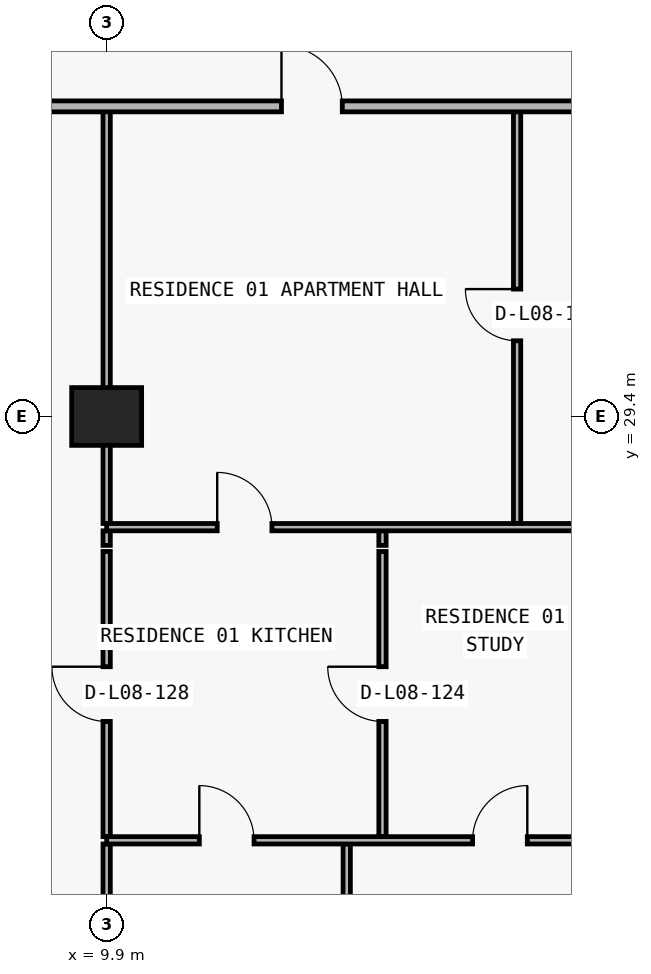
"""IFC4 building model, lengths in metres.
Left out: names, types, materials, properties, quantities, classifications, styles, units other than length and angle.
Written with IfcOpenShell. Run it as: python <this file> out.ifc"""

import sys

from ifc_helpers import new_model, si_unit, direction, frame, frame_2d, origin, origin_2d, place, context, subcontext, project, spatial, rectangle, extrude, element, fill, save


model = new_model("IFC4")
c1 = context("Model", 3, precision=1e-05, world=origin(), true_north=direction((0.0, 1.0)))
c2 = subcontext(c1, "Body", "Model", "MODEL_VIEW")
j1 = project(units=[si_unit("LENGTHUNIT", "METRE"), si_unit("PLANEANGLEUNIT", "RADIAN")], contexts=[c1])
p1 = place(None, origin())
s1 = spatial("IfcSite", under=j1, at=p1, CompositionType="ELEMENT")
p2 = place(p1, origin())
s2 = spatial("IfcBuilding", under=s1, at=p2, CompositionType="ELEMENT")
p3 = place(p2, frame((0.0, 0.0, 36.6)))
s3 = spatial("IfcBuildingStorey", under=s2, at=p3, CompositionType="ELEMENT", Elevation=36.6)
p4 = place(p3, frame((9.9, 29.4, 0.0), z_axis=(0.0, 0.0, 1.0), x_axis=(1.0, 0.0, 0.0)))
e1 = element("IfcColumn", 1, at=p4, inside=s3, PredefinedType="COLUMN", context=c2, shape_type="SweptSolid", body=[
    extrude(rectangle(XDim=1.15, YDim=0.95, at=origin_2d()), origin(), (0.0, 0.0, 1.0), 3.05),
])
p5 = place(p3, frame((9.9, 6.24, 0.0), z_axis=(0.0, 0.0, 1.0), x_axis=(0.0, 1.0, 0.0)))
e2 = element("IfcWall", 2, at=p5, inside=s3, PredefinedType="PARTITIONING", context=c2, shape_type="SweptSolid", body=[
    extrude(rectangle(XDim=16.13, YDim=0.12, at=frame_2d((8.065, 0.0))), origin(), (0.0, 0.0, 1.0), 2.11),
])
p6 = place(p3, frame((9.9, 22.49, 0.0), z_axis=(0.0, 0.0, 1.0), x_axis=(0.0, 1.0, 0.0)))
e3 = element("IfcWall", 3, at=p6, inside=s3, PredefinedType="PARTITIONING", context=c2, shape_type="SweptSolid", body=[
    extrude(rectangle(XDim=4.69, YDim=0.12, at=frame_2d((2.345, 0.0))), origin(), (0.0, 0.0, 1.0), 2.11),
])
p7 = place(p6, frame((1.895, 0.0, 0.0)))
e4 = element("IfcOpeningElement", 4, at=p7, cuts=e3, PredefinedType="OPENING", context=c2, shape_type="SweptSolid", body=[
    extrude(rectangle(XDim=0.9, YDim=2.06, at=frame_2d((0.45, 1.03))), frame((0.0, 0.07, 0.0), z_axis=(0.0, -1.0, 0.0), x_axis=(1.0, 0.0, 0.0)), (0.0, 0.0, 1.0), 0.14),
])
p8 = place(p3, frame((9.9, 27.28, 0.0), z_axis=(0.0, 0.0, 1.0), x_axis=(0.0, 1.0, 0.0)))
e5 = element("IfcWall", 5, at=p8, inside=s3, PredefinedType="PARTITIONING", context=c2, shape_type="SweptSolid", body=[
    extrude(rectangle(XDim=0.24, YDim=0.12, at=frame_2d((0.12, 0.0))), origin(), (0.0, 0.0, 1.0), 2.11),
])
p9 = place(p3, frame((9.9, 27.64, 0.0), z_axis=(0.0, 0.0, 1.0), x_axis=(0.0, 1.0, 0.0)))
e6 = element("IfcWall", 6, at=p9, inside=s3, PredefinedType="PARTITIONING", context=c2, shape_type="SweptSolid", body=[
    extrude(rectangle(XDim=6.86, YDim=0.12, at=frame_2d((3.43, 0.0))), origin(), (0.0, 0.0, 1.0), 2.11),
])
p10 = place(p3, frame((13.848, 6.24, 0.0), z_axis=(0.0, 0.0, 1.0), x_axis=(0.0, 1.0, 0.0)))
e7 = element("IfcWall", 7, at=p10, inside=s3, PredefinedType="PARTITIONING", context=c2, shape_type="SweptSolid", body=[
    extrude(rectangle(XDim=16.13, YDim=0.12, at=frame_2d((8.065, 0.0))), origin(), (0.0, 0.0, 1.0), 3.05),
])
p11 = place(p3, frame((14.436, 22.49, 0.0), z_axis=(0.0, 0.0, 1.0), x_axis=(0.0, 1.0, 0.0)))
e8 = element("IfcWall", 8, at=p11, inside=s3, PredefinedType="PARTITIONING", context=c2, shape_type="SweptSolid", body=[
    extrude(rectangle(XDim=4.69, YDim=0.12, at=frame_2d((2.345, 0.0))), origin(), (0.0, 0.0, 1.0), 3.05),
])
p12 = place(p11, frame((1.895, 0.0, 0.0)))
e9 = element("IfcOpeningElement", 9, at=p12, cuts=e8, PredefinedType="OPENING", context=c2, shape_type="SweptSolid", body=[
    extrude(rectangle(XDim=0.9, YDim=2.15, at=frame_2d((0.45, 1.075))), frame((0.0, 0.07, 0.0), z_axis=(0.0, -1.0, 0.0), x_axis=(1.0, 0.0, 0.0)), (0.0, 0.0, 1.0), 0.14),
])
p13 = place(p3, frame((14.436, 27.28, 0.0), z_axis=(0.0, 0.0, 1.0), x_axis=(0.0, 1.0, 0.0)))
e10 = element("IfcWall", 10, at=p13, inside=s3, PredefinedType="PARTITIONING", context=c2, shape_type="SweptSolid", body=[
    extrude(rectangle(XDim=0.24, YDim=0.12, at=frame_2d((0.12, 0.0))), origin(), (0.0, 0.0, 1.0), 3.05),
])
p14 = place(p3, frame((16.65, 27.64, 0.0), z_axis=(0.0, 0.0, 1.0), x_axis=(0.0, 1.0, 0.0)))
e11 = element("IfcWall", 11, at=p14, inside=s3, PredefinedType="PARTITIONING", context=c2, shape_type="SweptSolid", body=[
    extrude(rectangle(XDim=6.86, YDim=0.12, at=frame_2d((3.43, 0.0))), origin(), (0.0, 0.0, 1.0), 3.05),
])
p15 = place(p14, frame((3.005, 0.0, 0.0)))
e12 = element("IfcOpeningElement", 12, at=p15, cuts=e11, PredefinedType="OPENING", context=c2, shape_type="SweptSolid", body=[
    extrude(rectangle(XDim=0.85, YDim=2.1, at=frame_2d((0.425, 1.05))), frame((0.0, 0.07, 0.0), z_axis=(0.0, -1.0, 0.0), x_axis=(1.0, 0.0, 0.0)), (0.0, 0.0, 1.0), 0.14),
])
p16 = place(p3, frame((9.9, 22.43, 0.0), z_axis=(0.0, 0.0, 1.0), x_axis=(1.0, 0.0, 0.0)))
e13 = element("IfcWall", 13, at=p16, inside=s3, PredefinedType="PARTITIONING", context=c2, shape_type="SweptSolid", body=[
    extrude(rectangle(XDim=8.4, YDim=0.12, at=frame_2d((4.2, 0.0))), origin(), (0.0, 0.0, 1.0), 3.05),
])
p17 = place(p16, frame((1.524, 0.0, 0.0)))
e14 = element("IfcOpeningElement", 14, at=p17, cuts=e13, PredefinedType="OPENING", context=c2, shape_type="SweptSolid", body=[
    extrude(rectangle(XDim=0.9, YDim=2.15, at=frame_2d((0.45, 1.075))), frame((0.0, 0.07, 0.0), z_axis=(0.0, -1.0, 0.0), x_axis=(1.0, 0.0, 0.0)), (0.0, 0.0, 1.0), 0.14),
])
p18 = place(p16, frame((6.018, 0.0, 0.0)))
e15 = element("IfcOpeningElement", 15, at=p18, cuts=e13, PredefinedType="OPENING", context=c2, shape_type="SweptSolid", body=[
    extrude(rectangle(XDim=0.9, YDim=2.15, at=frame_2d((0.45, 1.075))), frame((0.0, 0.07, 0.0), z_axis=(0.0, -1.0, 0.0), x_axis=(1.0, 0.0, 0.0)), (0.0, 0.0, 1.0), 0.14),
])
p19 = place(p3, frame((9.9, 27.58, 0.0), z_axis=(0.0, 0.0, 1.0), x_axis=(1.0, 0.0, 0.0)))
e16 = element("IfcWall", 16, at=p19, inside=s3, PredefinedType="PARTITIONING", context=c2, shape_type="SweptSolid", body=[
    extrude(rectangle(XDim=8.4, YDim=0.12, at=frame_2d((4.2, 0.0))), origin(), (0.0, 0.0, 1.0), 3.05),
])
p20 = place(p19, frame((1.818, 0.0, 0.0)))
e17 = element("IfcOpeningElement", 17, at=p20, cuts=e16, PredefinedType="OPENING", context=c2, shape_type="SweptSolid", body=[
    extrude(rectangle(XDim=0.9, YDim=2.15, at=frame_2d((0.45, 1.075))), frame((0.0, 0.07, 0.0), z_axis=(0.0, -1.0, 0.0), x_axis=(1.0, 0.0, 0.0)), (0.0, 0.0, 1.0), 0.14),
])
p21 = place(p3, frame((5.105, 34.5, 0.0), z_axis=(0.0, 0.0, 1.0), x_axis=(1.0, 0.0, 0.0)))
e18 = element("IfcWall", 18, at=p21, inside=s3, PredefinedType="PARTITIONING", context=c2, shape_type="SweptSolid", body=[
    extrude(rectangle(XDim=50.781, YDim=0.18, at=frame_2d((25.391, 0.0))), origin(), (0.0, 0.0, 1.0), 3.05),
])
p22 = place(p21, frame((7.67, 0.0, 0.0)))
e19 = element("IfcOpeningElement", 19, at=p22, cuts=e18, PredefinedType="OPENING", context=c2, shape_type="SweptSolid", body=[
    extrude(rectangle(XDim=1.0, YDim=2.2, at=frame_2d((0.5, 1.1))), frame((0.0, 0.1, 0.0), z_axis=(0.0, -1.0, 0.0), x_axis=(1.0, 0.0, 0.0)), (0.0, 0.0, 1.0), 0.2),
])
p23 = place(p21, frame((16.07, 0.0, 0.0)))
e20 = element("IfcOpeningElement", 20, at=p23, cuts=e18, PredefinedType="OPENING", context=c2, shape_type="SweptSolid", body=[
    extrude(rectangle(XDim=1.0, YDim=2.2, at=frame_2d((0.5, 1.1))), frame((0.0, 0.1, 0.0), z_axis=(0.0, -1.0, 0.0), x_axis=(1.0, 0.0, 0.0)), (0.0, 0.0, 1.0), 0.2),
])
p24 = place(p21, frame((24.47, 0.0, 0.0)))
e21 = element("IfcOpeningElement", 21, at=p24, cuts=e18, PredefinedType="OPENING", context=c2, shape_type="SweptSolid", body=[
    extrude(rectangle(XDim=1.0, YDim=2.2, at=frame_2d((0.5, 1.1))), frame((0.0, 0.1, 0.0), z_axis=(0.0, -1.0, 0.0), x_axis=(1.0, 0.0, 0.0)), (0.0, 0.0, 1.0), 0.2),
])
p25 = place(p21, frame((32.545, 0.0, 0.0)))
e22 = element("IfcOpeningElement", 22, at=p25, cuts=e18, PredefinedType="OPENING", context=c2, shape_type="SweptSolid", body=[
    extrude(rectangle(XDim=1.0, YDim=2.2, at=frame_2d((0.5, 1.1))), frame((0.0, 0.1, 0.0), z_axis=(0.0, -1.0, 0.0), x_axis=(1.0, 0.0, 0.0)), (0.0, 0.0, 1.0), 0.2),
])
p26 = place(p21, frame((47.888, 0.0, 0.0)))
e23 = element("IfcOpeningElement", 23, at=p26, cuts=e18, PredefinedType="OPENING", context=c2, shape_type="SweptSolid", body=[
    extrude(rectangle(XDim=1.0, YDim=2.2, at=frame_2d((0.5, 1.1))), frame((0.0, 0.1, 0.0), z_axis=(0.0, -1.0, 0.0), x_axis=(1.0, 0.0, 0.0)), (0.0, 0.0, 1.0), 0.2),
])
p27 = place(p22, origin())
e24 = element("IfcDoor", 24, at=p27, inside=s3, OperationType="SINGLE_SWING_LEFT", PredefinedType="DOOR", context=c2, shape_type="SweptSolid", body=[
    extrude(rectangle(XDim=1.0, YDim=2.2, at=frame_2d((0.5, 1.1))), frame((0.0, 0.025, 0.0), z_axis=(0.0, -1.0, 0.0), x_axis=(1.0, 0.0, 0.0)), (0.0, 0.0, 1.0), 0.05),
])
fill(e19, e24)
p28 = place(p15, origin())
e25 = element("IfcDoor", 25, at=p28, inside=s3, OperationType="SINGLE_SWING_RIGHT", PredefinedType="DOOR", context=c2, shape_type="SweptSolid", body=[
    extrude(rectangle(XDim=0.85, YDim=2.1, at=frame_2d((0.425, 1.05))), frame((0.0, 0.025, 0.0), z_axis=(0.0, -1.0, 0.0), x_axis=(1.0, 0.0, 0.0)), (0.0, 0.0, 1.0), 0.05),
])
fill(e12, e25)
p29 = place(p20, origin())
e26 = element("IfcDoor", 26, at=p29, inside=s3, OperationType="SINGLE_SWING_LEFT", PredefinedType="DOOR", context=c2, shape_type="SweptSolid", body=[
    extrude(rectangle(XDim=0.9, YDim=2.15, at=frame_2d((0.45, 1.075))), frame((0.0, 0.025, 0.0), z_axis=(0.0, -1.0, 0.0), x_axis=(1.0, 0.0, 0.0)), (0.0, 0.0, 1.0), 0.05),
])
fill(e17, e26)
p30 = place(p12, origin())
e27 = element("IfcDoor", 27, at=p30, inside=s3, OperationType="SINGLE_SWING_RIGHT", PredefinedType="DOOR", context=c2, shape_type="SweptSolid", body=[
    extrude(rectangle(XDim=0.9, YDim=2.15, at=frame_2d((0.45, 1.075))), frame((0.0, 0.025, 0.0), z_axis=(0.0, -1.0, 0.0), x_axis=(1.0, 0.0, 0.0)), (0.0, 0.0, 1.0), 0.05),
])
fill(e9, e27)
p31 = place(p17, origin())
e28 = element("IfcDoor", 28, at=p31, inside=s3, OperationType="SINGLE_SWING_LEFT", PredefinedType="DOOR", context=c2, shape_type="SweptSolid", body=[
    extrude(rectangle(XDim=0.9, YDim=2.15, at=frame_2d((0.45, 1.075))), frame((0.0, 0.025, 0.0), z_axis=(0.0, -1.0, 0.0), x_axis=(1.0, 0.0, 0.0)), (0.0, 0.0, 1.0), 0.05),
])
fill(e14, e28)
p32 = place(p18, origin())
e29 = element("IfcDoor", 29, at=p32, inside=s3, OperationType="SINGLE_SWING_RIGHT", PredefinedType="DOOR", context=c2, shape_type="SweptSolid", body=[
    extrude(rectangle(XDim=0.9, YDim=2.15, at=frame_2d((0.45, 1.075))), frame((0.0, 0.025, 0.0), z_axis=(0.0, -1.0, 0.0), x_axis=(1.0, 0.0, 0.0)), (0.0, 0.0, 1.0), 0.05),
])
fill(e15, e29)
p33 = place(p7, origin())
e30 = element("IfcDoor", 30, at=p33, inside=s3, OperationType="SINGLE_SWING_RIGHT", PredefinedType="DOOR", context=c2, shape_type="SweptSolid", body=[
    extrude(rectangle(XDim=0.9, YDim=2.06, at=frame_2d((0.45, 1.03))), frame((0.0, 0.025, 0.0), z_axis=(0.0, -1.0, 0.0), x_axis=(1.0, 0.0, 0.0)), (0.0, 0.0, 1.0), 0.05),
])
fill(e4, e30)
save(model, sys.argv[1])
